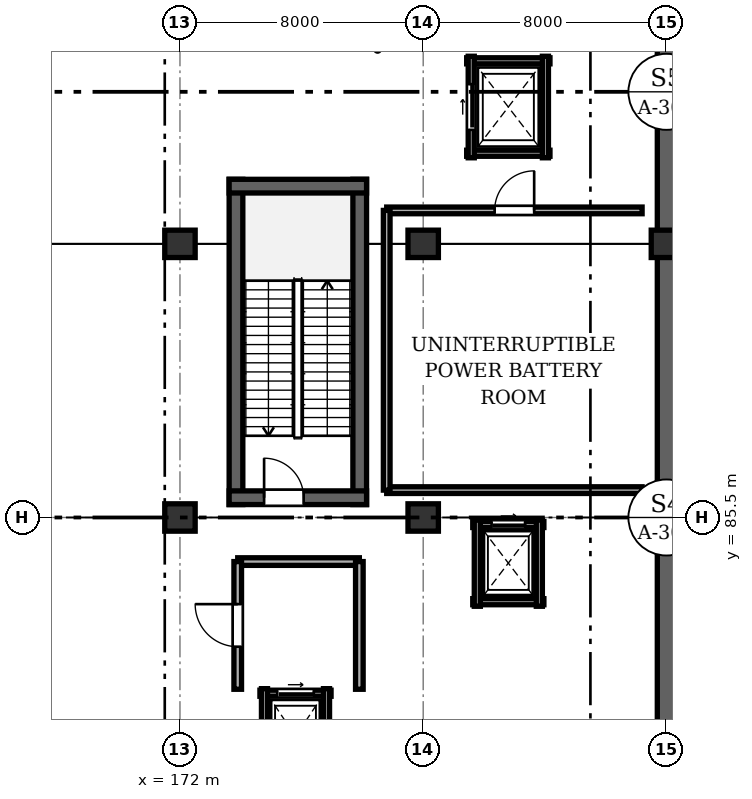
"""IFC4 building model, lengths in metres.
Left out: names, types, materials, properties, quantities, classifications, styles, units other than length and angle.
Written with IfcOpenShell. Run it as: python <this file> out.ifc"""

import sys

from ifc_helpers import new_model, si_unit, direction, frame, frame_2d, origin, origin_2d, place, context, subcontext, project, spatial, rectangle, extrude, element, fill, save


model = new_model("IFC4")
c1 = context("Model", 3, precision=1e-05, world=origin(), true_north=direction((0.0, 1.0)))
c2 = subcontext(c1, "Body", "Model", "MODEL_VIEW")
j1 = project(units=[si_unit("LENGTHUNIT", "METRE"), si_unit("PLANEANGLEUNIT", "RADIAN")], contexts=[c1])
p1 = place(None, origin())
s1 = spatial("IfcSite", under=j1, at=p1, CompositionType="ELEMENT")
p2 = place(p1, origin())
s2 = spatial("IfcBuilding", under=s1, at=p2, CompositionType="ELEMENT")
p3 = place(p2, frame((0.0, 0.0, -5.4)))
s3 = spatial("IfcBuildingStorey", under=s2, at=p3, CompositionType="ELEMENT", Elevation=-5.4)
for number, where, z_axis, x_axis in (
    (1, (172.0, 85.5, 0.0), (0.0, 0.0, 1.0), (1.0, 0.0, 0.0)),
    (2, (172.0, 94.5, 0.0), (0.0, 0.0, 1.0), (1.0, 0.0, 0.0)),
    (3, (180.0, 85.5, 0.0), (0.0, 0.0, 1.0), (1.0, 0.0, 0.0)),
    (4, (180.0, 94.5, 0.0), (0.0, 0.0, 1.0), (1.0, 0.0, 0.0)),
    (5, (188.0, 85.5, 0.0), (0.0, 0.0, 1.0), (1.0, 0.0, 0.0)),
    (6, (188.0, 94.5, 0.0), (0.0, 0.0, 1.0), (1.0, 0.0, 0.0)),
):
    element("IfcColumn", number, at=place(p3, frame(where, z_axis=z_axis, x_axis=x_axis)), inside=s3, PredefinedType="COLUMN", context=c2, shape_type="SweptSolid", body=[
        extrude(rectangle(XDim=1.0, YDim=0.9, at=origin_2d()), origin(), (0.0, 0.0, 1.0), 5.4),
    ])
p4 = place(p3, frame((188.0, 61.2, 0.0), z_axis=(0.0, 0.0, 1.0), x_axis=(0.0, 1.0, 0.0)))
e7 = element("IfcWall", 7, at=p4, inside=s3, PredefinedType="USERDEFINED", context=c2, shape_type="SweptSolid", body=[
    extrude(rectangle(XDim=64.8, YDim=0.6, at=frame_2d((32.4, 0.0))), origin(), (0.0, 0.0, 1.0), 5.1),
])
for number, where, z_axis, x_axis in (
    (8, (177.913, 85.925, 0.0), (0.0, 0.0, 1.0), (0.0, 1.0, 0.0)),
    (9, (173.843, 96.623, 0.0), (0.0, 0.0, 1.0), (0.0, -1.0, 0.0)),
):
    element("IfcWall", number, at=place(p3, frame(where, z_axis=z_axis, x_axis=x_axis)), inside=s3, PredefinedType="SHEAR", context=c2, shape_type="SweptSolid", body=[
        extrude(rectangle(XDim=10.698, YDim=0.45, at=frame_2d((5.349, 0.0))), origin(), (0.0, 0.0, 1.0), 5.1),
    ])
p5 = place(p3, frame((178.137, 96.397, 0.0), z_axis=(0.0, 0.0, 1.0), x_axis=(-1.0, 0.0, 0.0)))
e10 = element("IfcWall", 10, at=p5, inside=s3, PredefinedType="SHEAR", context=c2, shape_type="SweptSolid", body=[
    extrude(rectangle(XDim=4.52, YDim=0.45, at=frame_2d((2.26, 0.0))), origin(), (0.0, 0.0, 1.0), 5.1),
])
p6 = place(p3, frame((173.617, 86.15, 0.0), z_axis=(0.0, 0.0, 1.0), x_axis=(1.0, 0.0, 0.0)))
e11 = element("IfcWall", 11, at=p6, inside=s3, PredefinedType="SHEAR", context=c2, shape_type="SweptSolid", body=[
    extrude(rectangle(XDim=4.52, YDim=0.45, at=frame_2d((2.26, 0.0))), origin(), (0.0, 0.0, 1.0), 5.1),
])
p7 = place(p6, frame((1.15, 0.0, 0.0)))
e12 = element("IfcOpeningElement", 12, at=p7, cuts=e11, PredefinedType="OPENING", context=c2, shape_type="SweptSolid", body=[
    extrude(rectangle(XDim=1.3, YDim=2.1, at=frame_2d((0.65, 1.05))), frame((0.0, 0.235, 0.0), z_axis=(0.0, -1.0, 0.0), x_axis=(1.0, 0.0, 0.0)), (0.0, 0.0, 1.0), 0.47),
])
p8 = place(p3, frame((176.97, 79.72, 0.0), z_axis=(0.0, 0.0, 1.0), x_axis=(-1.0, 0.0, 0.0)))
e13 = element("IfcWall", 13, at=p8, inside=s3, PredefinedType="SOLIDWALL", context=c2, shape_type="SweptSolid", body=[
    extrude(rectangle(XDim=2.34, YDim=0.2, at=frame_2d((1.17, 0.0))), origin(), (0.0, 0.0, 1.0), 4.4),
])
p9 = place(p8, frame((0.57, 0.0, 0.0)))
e14 = element("IfcOpeningElement", 14, at=p9, cuts=e13, PredefinedType="OPENING", context=c2, shape_type="SweptSolid", body=[
    extrude(rectangle(XDim=1.2, YDim=2.15, at=frame_2d((0.6, 1.075))), frame((0.0, 0.11, 0.0), z_axis=(0.0, -1.0, 0.0), x_axis=(1.0, 0.0, 0.0)), (0.0, 0.0, 1.0), 0.22),
])
for number, where, z_axis, x_axis in (
    (15, (174.78, 79.87, 0.0), (0.0, 0.0, 1.0), (0.0, -1.0, 0.0)),
    (16, (176.82, 76.73, 0.0), (0.0, 0.0, 1.0), (0.0, 1.0, 0.0)),
):
    element("IfcWall", number, at=place(p3, frame(where, z_axis=z_axis, x_axis=x_axis)), inside=s3, PredefinedType="SOLIDWALL", context=c2, shape_type="SweptSolid", body=[
        extrude(rectangle(XDim=3.14, YDim=0.2, at=frame_2d((1.57, 0.0))), origin(), (0.0, 0.0, 1.0), 4.4),
    ])
p10 = place(p3, frame((181.63, 82.73, 0.0), z_axis=(0.0, 0.0, 1.0), x_axis=(1.0, 0.0, 0.0)))
e17 = element("IfcWall", 17, at=p10, inside=s3, PredefinedType="SOLIDWALL", context=c2, shape_type="SweptSolid", body=[
    extrude(rectangle(XDim=2.34, YDim=0.2, at=frame_2d((1.17, 0.0))), origin(), (0.0, 0.0, 1.0), 4.4),
])
p11 = place(p3, frame((183.97, 85.27, 0.0), z_axis=(0.0, 0.0, 1.0), x_axis=(-1.0, 0.0, 0.0)))
e18 = element("IfcWall", 18, at=p11, inside=s3, PredefinedType="SOLIDWALL", context=c2, shape_type="SweptSolid", body=[
    extrude(rectangle(XDim=2.34, YDim=0.2, at=frame_2d((1.17, 0.0))), origin(), (0.0, 0.0, 1.0), 4.4),
])
p12 = place(p11, frame((0.62, 0.0, 0.0)))
e19 = element("IfcOpeningElement", 19, at=p12, cuts=e18, PredefinedType="OPENING", context=c2, shape_type="SweptSolid", body=[
    extrude(rectangle(XDim=1.1, YDim=2.15, at=frame_2d((0.55, 1.075))), frame((0.0, 0.11, 0.0), z_axis=(0.0, -1.0, 0.0), x_axis=(1.0, 0.0, 0.0)), (0.0, 0.0, 1.0), 0.22),
])
for number, where, z_axis, x_axis in (
    (20, (181.78, 85.42, 0.0), (0.0, 0.0, 1.0), (0.0, -1.0, 0.0)),
    (21, (183.82, 82.58, 0.0), (0.0, 0.0, 1.0), (0.0, 1.0, 0.0)),
):
    element("IfcWall", number, at=place(p3, frame(where, z_axis=z_axis, x_axis=x_axis)), inside=s3, PredefinedType="SOLIDWALL", context=c2, shape_type="SweptSolid", body=[
        extrude(rectangle(XDim=2.84, YDim=0.2, at=frame_2d((1.42, 0.0))), origin(), (0.0, 0.0, 1.0), 4.4),
    ])
for number, where, z_axis, x_axis in (
    (22, (181.43, 97.48, 0.0), (0.0, 0.0, 1.0), (1.0, 0.0, 0.0)),
    (23, (184.17, 100.52, 0.0), (0.0, 0.0, 1.0), (-1.0, 0.0, 0.0)),
):
    element("IfcWall", number, at=place(p3, frame(where, z_axis=z_axis, x_axis=x_axis)), inside=s3, PredefinedType="SOLIDWALL", context=c2, shape_type="SweptSolid", body=[
        extrude(rectangle(XDim=2.74, YDim=0.2, at=frame_2d((1.37, 0.0))), origin(), (0.0, 0.0, 1.0), 4.4),
    ])
p13 = place(p3, frame((181.58, 100.67, 0.0), z_axis=(0.0, 0.0, 1.0), x_axis=(0.0, -1.0, 0.0)))
e24 = element("IfcWall", 24, at=p13, inside=s3, PredefinedType="SOLIDWALL", context=c2, shape_type="SweptSolid", body=[
    extrude(rectangle(XDim=3.34, YDim=0.2, at=frame_2d((1.67, 0.0))), origin(), (0.0, 0.0, 1.0), 4.4),
])
p14 = place(p13, frame((0.92, 0.0, 0.0)))
e25 = element("IfcOpeningElement", 25, at=p14, cuts=e24, PredefinedType="OPENING", context=c2, shape_type="SweptSolid", body=[
    extrude(rectangle(XDim=1.5, YDim=2.2, at=frame_2d((0.75, 1.1))), frame((0.0, 0.11, 0.0), z_axis=(0.0, -1.0, 0.0), x_axis=(1.0, 0.0, 0.0)), (0.0, 0.0, 1.0), 0.22),
])
p15 = place(p3, frame((184.02, 97.33, 0.0), z_axis=(0.0, 0.0, 1.0), x_axis=(0.0, 1.0, 0.0)))
e26 = element("IfcWall", 26, at=p15, inside=s3, PredefinedType="SOLIDWALL", context=c2, shape_type="SweptSolid", body=[
    extrude(rectangle(XDim=3.34, YDim=0.2, at=frame_2d((1.67, 0.0))), origin(), (0.0, 0.0, 1.0), 4.4),
])
p16 = place(p3, frame((187.2, 86.4, 0.0), z_axis=(0.0, 0.0, 1.0), x_axis=(-1.0, 0.0, 0.0)))
e27 = element("IfcWall", 27, at=p16, inside=s3, PredefinedType="SOLIDWALL", context=c2, shape_type="SweptSolid", body=[
    extrude(rectangle(XDim=8.4, YDim=0.22, at=frame_2d((4.2, 0.0))), origin(), (0.0, 0.0, 1.0), 4.4),
])
p17 = place(p3, frame((178.8, 95.6, 0.0), z_axis=(0.0, 0.0, 1.0), x_axis=(1.0, 0.0, 0.0)))
e28 = element("IfcWall", 28, at=p17, inside=s3, PredefinedType="SOLIDWALL", context=c2, shape_type="SweptSolid", body=[
    extrude(rectangle(XDim=8.4, YDim=0.22, at=frame_2d((4.2, 0.0))), origin(), (0.0, 0.0, 1.0), 4.4),
])
p18 = place(p17, frame((3.55, 0.0, 0.0)))
e29 = element("IfcOpeningElement", 29, at=p18, cuts=e28, PredefinedType="OPENING", context=c2, shape_type="SweptSolid", body=[
    extrude(rectangle(XDim=1.3, YDim=2.1, at=frame_2d((0.65, 1.05))), frame((0.0, 0.12, 0.0), z_axis=(0.0, -1.0, 0.0), x_axis=(1.0, 0.0, 0.0)), (0.0, 0.0, 1.0), 0.24),
])
p19 = place(p3, frame((178.8, 86.4, 0.0), z_axis=(0.0, 0.0, 1.0), x_axis=(0.0, 1.0, 0.0)))
e30 = element("IfcWall", 30, at=p19, inside=s3, PredefinedType="SOLIDWALL", context=c2, shape_type="SweptSolid", body=[
    extrude(rectangle(XDim=9.2, YDim=0.22, at=frame_2d((4.6, 0.0))), origin(), (0.0, 0.0, 1.0), 4.4),
])
p20 = place(p3, frame((173.9, 84.05, 0.0), z_axis=(0.0, 0.0, 1.0), x_axis=(1.0, 0.0, 0.0)))
e31 = element("IfcWall", 31, at=p20, inside=s3, PredefinedType="SOLIDWALL", context=c2, shape_type="SweptSolid", body=[
    extrude(rectangle(XDim=4.0, YDim=0.25, at=frame_2d((2.0, 0.0))), origin(), (0.0, 0.0, 1.0), 4.4),
])
p21 = place(p3, frame((173.9, 79.85, 0.0), z_axis=(0.0, 0.0, 1.0), x_axis=(0.0, 1.0, 0.0)))
e32 = element("IfcWall", 32, at=p21, inside=s3, PredefinedType="SOLIDWALL", context=c2, shape_type="SweptSolid", body=[
    extrude(rectangle(XDim=4.2, YDim=0.25, at=frame_2d((2.1, 0.0))), origin(), (0.0, 0.0, 1.0), 4.4),
])
p22 = place(p21, frame((1.4, 0.0, 0.0)))
e33 = element("IfcOpeningElement", 33, at=p22, cuts=e32, PredefinedType="OPENING", context=c2, shape_type="SweptSolid", body=[
    extrude(rectangle(XDim=1.4, YDim=2.1, at=frame_2d((0.7, 1.05))), frame((0.0, 0.135, 0.0), z_axis=(0.0, -1.0, 0.0), x_axis=(1.0, 0.0, 0.0)), (0.0, 0.0, 1.0), 0.27),
])
p23 = place(p3, frame((177.9, 84.05, 0.0), z_axis=(0.0, 0.0, 1.0), x_axis=(0.0, -1.0, 0.0)))
e34 = element("IfcWall", 34, at=p23, inside=s3, PredefinedType="SOLIDWALL", context=c2, shape_type="SweptSolid", body=[
    extrude(rectangle(XDim=4.2, YDim=0.25, at=frame_2d((2.1, 0.0))), origin(), (0.0, 0.0, 1.0), 4.4),
])
p24 = place(p7, origin())
e35 = element("IfcDoor", 35, at=p24, inside=s3, OperationType="SINGLE_SWING_LEFT", PredefinedType="DOOR", context=c2, shape_type="SweptSolid", body=[
    extrude(rectangle(XDim=1.3, YDim=2.1, at=frame_2d((0.65, 1.05))), frame((0.0, 0.025, 0.0), z_axis=(0.0, -1.0, 0.0), x_axis=(1.0, 0.0, 0.0)), (0.0, 0.0, 1.0), 0.05),
])
fill(e12, e35)
p25 = place(p9, origin())
e36 = element("IfcDoor", 36, at=p25, inside=s3, OperationType="SLIDING_TO_LEFT", PredefinedType="DOOR", context=c2, shape_type="SweptSolid", body=[
    extrude(rectangle(XDim=1.2, YDim=2.15, at=frame_2d((0.6, 1.075))), frame((0.0, 0.025, 0.0), z_axis=(0.0, -1.0, 0.0), x_axis=(1.0, 0.0, 0.0)), (0.0, 0.0, 1.0), 0.05),
])
fill(e14, e36)
p26 = place(p12, origin())
e37 = element("IfcDoor", 37, at=p26, inside=s3, OperationType="SLIDING_TO_LEFT", PredefinedType="DOOR", context=c2, shape_type="SweptSolid", body=[
    extrude(rectangle(XDim=1.1, YDim=2.15, at=frame_2d((0.55, 1.075))), frame((0.0, 0.025, 0.0), z_axis=(0.0, -1.0, 0.0), x_axis=(1.0, 0.0, 0.0)), (0.0, 0.0, 1.0), 0.05),
])
fill(e19, e37)
p27 = place(p14, origin())
e38 = element("IfcDoor", 38, at=p27, inside=s3, OperationType="SLIDING_TO_LEFT", PredefinedType="DOOR", context=c2, shape_type="SweptSolid", body=[
    extrude(rectangle(XDim=1.5, YDim=2.2, at=frame_2d((0.75, 1.1))), frame((0.0, 0.025, 0.0), z_axis=(0.0, -1.0, 0.0), x_axis=(1.0, 0.0, 0.0)), (0.0, 0.0, 1.0), 0.05),
])
fill(e25, e38)
p28 = place(p18, origin())
e39 = element("IfcDoor", 39, at=p28, inside=s3, OperationType="SINGLE_SWING_RIGHT", PredefinedType="DOOR", context=c2, shape_type="SweptSolid", body=[
    extrude(rectangle(XDim=1.3, YDim=2.1, at=frame_2d((0.65, 1.05))), frame((0.0, 0.025, 0.0), z_axis=(0.0, -1.0, 0.0), x_axis=(1.0, 0.0, 0.0)), (0.0, 0.0, 1.0), 0.05),
])
fill(e29, e39)
p29 = place(p22, origin())
e40 = element("IfcDoor", 40, at=p29, inside=s3, OperationType="SINGLE_SWING_RIGHT", PredefinedType="DOOR", context=c2, shape_type="SweptSolid", body=[
    extrude(rectangle(XDim=1.4, YDim=2.1, at=frame_2d((0.7, 1.05))), frame((0.0, 0.025, 0.0), z_axis=(0.0, -1.0, 0.0), x_axis=(1.0, 0.0, 0.0)), (0.0, 0.0, 1.0), 0.05),
])
fill(e33, e40)
save(model, sys.argv[1])
